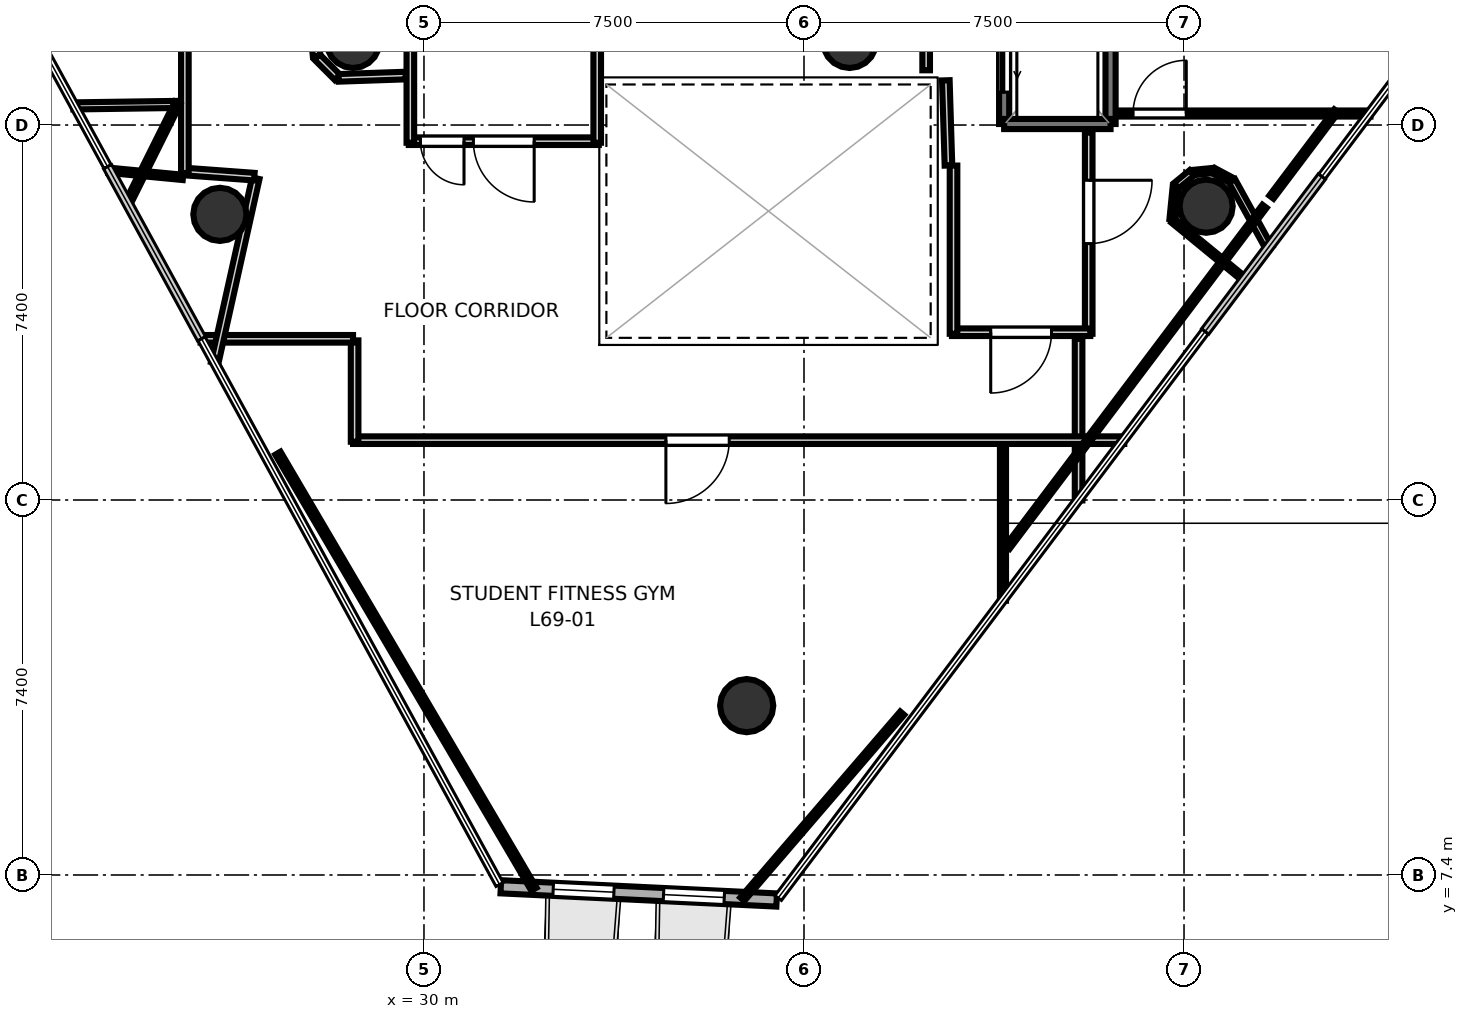
"""IFC4 building model, lengths in metres.
Left out: names, types, materials, properties, quantities, classifications, styles, units other than length and angle.
Written with IfcOpenShell. Run it as: python <this file> out.ifc"""

import sys

from ifc_helpers import new_model, si_unit, direction, frame, frame_2d, origin, origin_2d, place, context, subcontext, project, spatial, rectangle, hollow_circle, extrude, element, fill, save


model = new_model("IFC4")
c1 = context("Model", 3, precision=1e-05, world=origin(), true_north=direction((0.0, 1.0)))
c2 = subcontext(c1, "Body", "Model", "MODEL_VIEW")
j1 = project(units=[si_unit("LENGTHUNIT", "METRE"), si_unit("PLANEANGLEUNIT", "RADIAN")], contexts=[c1])
p1 = place(None, origin())
s1 = spatial("IfcSite", under=j1, at=p1, CompositionType="ELEMENT")
p2 = place(p1, origin())
s2 = spatial("IfcBuilding", under=s1, at=p2, CompositionType="ELEMENT")
p3 = place(p2, frame((0.0, 0.0, 268.6)))
s3 = spatial("IfcBuildingStorey", under=s2, at=p3, CompositionType="ELEMENT", Elevation=268.6)
for number, where, z_axis, x_axis in (
    (1, (28.6, 23.85, 0.0), (0.0, 0.0, 1.0), (1.0, 0.0, 0.0)),
    (2, (38.4, 23.85, 0.0), (0.0, 0.0, 1.0), (1.0, 0.0, 0.0)),
    (3, (25.972, 20.437, 0.0), (0.0, 0.0, 1.0), (1.0, 0.0, 0.0)),
    (4, (36.369, 10.742, 0.0), (0.0, 0.0, 1.0), (1.0, 0.0, 0.0)),
    (5, (45.436, 20.598, 0.0), (0.0, 0.0, 1.0), (1.0, 0.0, 0.0)),
):
    element("IfcColumn", number, at=place(p3, frame(where, z_axis=z_axis, x_axis=x_axis)), inside=s3, PredefinedType="COLUMN", context=c2, shape_type="SweptSolid", body=[
        extrude(hollow_circle(Radius=0.525, WallThickness=0.028, at=origin_2d()), origin(), (0.0, 0.0, 1.0), 3.7),
    ])
p4 = place(p3, frame((31.516, 7.167, 0.0), z_axis=(0.0, 0.0, 1.0), x_axis=(0.998850638903, -0.047931212827, 0.0)))
e6 = element("IfcWall", 6, at=p4, inside=s3, PredefinedType="SOLIDWALL", context=c2, shape_type="SweptSolid", body=[
    extrude(rectangle(XDim=5.45, YDim=0.26, at=frame_2d((2.725, 0.0))), origin(), (0.0, 0.0, 1.0), 3.52),
])
p5 = place(p4, frame((1.035, 0.0, 0.9)))
e7 = element("IfcOpeningElement", 7, at=p5, cuts=e6, PredefinedType="OPENING", context=c2, shape_type="SweptSolid", body=[
    extrude(rectangle(XDim=1.2, YDim=2.0, at=frame_2d((0.6, 1.0))), frame((0.0, 0.14, 0.0), z_axis=(0.0, -1.0, 0.0), x_axis=(1.0, 0.0, 0.0)), (0.0, 0.0, 1.0), 0.28),
])
p6 = place(p4, frame((3.215, 0.0, 0.9)))
e8 = element("IfcOpeningElement", 8, at=p6, cuts=e6, PredefinedType="OPENING", context=c2, shape_type="SweptSolid", body=[
    extrude(rectangle(XDim=1.2, YDim=2.0, at=frame_2d((0.6, 1.0))), frame((0.0, 0.14, 0.0), z_axis=(0.0, -1.0, 0.0), x_axis=(1.0, 0.0, 0.0)), (0.0, 0.0, 1.0), 0.28),
])
p7 = place(p3, frame((43.55, 22.22, 0.0), z_axis=(0.0, 0.0, 1.0), x_axis=(0.0, 1.0, 0.0)))
e9 = element("IfcWall", 9, at=p7, inside=s3, PredefinedType="SOLIDWALL", context=c2, shape_type="SweptSolid", body=[
    extrude(rectangle(XDim=2.36, YDim=0.2, at=frame_2d((1.18, 0.0))), origin(), (0.0, 0.0, 1.0), 3.52),
])
p8 = place(p3, frame((41.45, 22.22, 0.0), z_axis=(0.0, 0.0, 1.0), x_axis=(0.0, 1.0, 0.0)))
e10 = element("IfcWall", 10, at=p8, inside=s3, PredefinedType="SOLIDWALL", context=c2, shape_type="SweptSolid", body=[
    extrude(rectangle(XDim=2.36, YDim=0.2, at=frame_2d((1.18, 0.0))), origin(), (0.0, 0.0, 1.0), 3.52),
])
p9 = place(p8, frame((0.63, 0.0, 0.0)))
e11 = element("IfcOpeningElement", 11, at=p9, cuts=e10, PredefinedType="OPENING", context=c2, shape_type="SweptSolid", body=[
    extrude(rectangle(XDim=1.1, YDim=2.15, at=frame_2d((0.55, 1.075))), frame((0.0, 0.11, 0.0), z_axis=(0.0, -1.0, 0.0), x_axis=(1.0, 0.0, 0.0)), (0.0, 0.0, 1.0), 0.22),
])
p10 = place(p3, frame((41.45, 22.22, 0.0), z_axis=(0.0, 0.0, 1.0), x_axis=(1.0, 0.0, 0.0)))
e12 = element("IfcWall", 12, at=p10, inside=s3, PredefinedType="SOLIDWALL", context=c2, shape_type="SweptSolid", body=[
    extrude(rectangle(XDim=2.1, YDim=0.2, at=frame_2d((1.05, 0.0))), origin(), (0.0, 0.0, 1.0), 3.52),
])
p11 = place(p3, frame((33.45, 21.881, 0.0), z_axis=(0.0, 0.0, 1.0), x_axis=(-1.0, 0.0, 0.0)))
e13 = element("IfcWall", 13, at=p11, inside=s3, PredefinedType="PARTITIONING", context=c2, shape_type="SweptSolid", body=[
    extrude(rectangle(XDim=3.75, YDim=0.15, at=frame_2d((1.875, 0.0))), origin(), (0.0, 0.0, 1.0), 2.84),
])
p12 = place(p11, frame((1.275, 0.0, 0.0)))
e14 = element("IfcOpeningElement", 14, at=p12, cuts=e13, PredefinedType="OPENING", context=c2, shape_type="SweptSolid", body=[
    extrude(rectangle(XDim=1.2, YDim=2.15, at=frame_2d((0.6, 1.075))), frame((0.0, 0.085, 0.0), z_axis=(0.0, -1.0, 0.0), x_axis=(1.0, 0.0, 0.0)), (0.0, 0.0, 1.0), 0.17),
])
p13 = place(p11, frame((2.66, 0.0, 0.0)))
e15 = element("IfcOpeningElement", 15, at=p13, cuts=e13, PredefinedType="OPENING", context=c2, shape_type="SweptSolid", body=[
    extrude(rectangle(XDim=0.86, YDim=2.05, at=frame_2d((0.43, 1.025))), frame((0.0, 0.085, 0.0), z_axis=(0.0, -1.0, 0.0), x_axis=(1.0, 0.0, 0.0)), (0.0, 0.0, 1.0), 0.17),
])
for number, where, z_axis, x_axis in (
    (16, (29.731, 21.85, 0.0), (0.0, 0.0, 1.0), (0.0, 1.0, 0.0)),
    (17, (33.419, 24.542, 0.0), (0.0, 0.0, 1.0), (0.0, -1.0, 0.0)),
):
    element("IfcWall", number, at=place(p3, frame(where, z_axis=z_axis, x_axis=x_axis)), inside=s3, PredefinedType="PARTITIONING", context=c2, shape_type="SweptSolid", body=[
        extrude(rectangle(XDim=2.692, YDim=0.15, at=frame_2d((1.346, 0.0))), origin(), (0.0, 0.0, 1.0), 2.84),
    ])
p14 = place(p3, frame((40.351, 21.401, 0.0), z_axis=(0.0, 0.0, 1.0), x_axis=(-0.031058045979, 0.999517582527, 0.0)))
e18 = element("IfcWall", 18, at=p14, inside=s3, PredefinedType="PARTITIONING", context=c2, shape_type="SweptSolid", body=[
    extrude(rectangle(XDim=1.682, YDim=0.15, at=frame_2d((0.841, 0.0))), origin(), (0.0, 0.0, 1.0), 2.84),
])
p15 = place(p3, frame((39.911, 23.28, 0.0), z_axis=(0.0, 0.0, 1.0), x_axis=(0.0, 1.0, 0.0)))
e19 = element("IfcWall", 19, at=p15, inside=s3, PredefinedType="PARTITIONING", context=c2, shape_type="SweptSolid", body=[
    extrude(rectangle(XDim=1.48, YDim=0.15, at=frame_2d((0.74, 0.0))), origin(), (0.0, 0.0, 1.0), 2.84),
])
p16 = place(p3, frame((43.119, 22.05, 0.0), z_axis=(0.0, 0.0, 1.0), x_axis=(0.0, -1.0, 0.0)))
e20 = element("IfcWall", 20, at=p16, inside=s3, PredefinedType="PARTITIONING", context=c2, shape_type="SweptSolid", body=[
    extrude(rectangle(XDim=3.97, YDim=0.15, at=frame_2d((1.985, 0.0))), origin(), (0.0, 0.0, 1.0), 2.84),
])
p17 = place(p16, frame((0.94, 0.0, 0.0)))
e21 = element("IfcOpeningElement", 21, at=p17, cuts=e20, PredefinedType="OPENING", context=c2, shape_type="SweptSolid", body=[
    extrude(rectangle(XDim=1.25, YDim=2.2, at=frame_2d((0.625, 1.1))), frame((0.0, 0.085, 0.0), z_axis=(0.0, -1.0, 0.0), x_axis=(1.0, 0.0, 0.0)), (0.0, 0.0, 1.0), 0.17),
])
p18 = place(p3, frame((43.15, 18.111, 0.0), z_axis=(0.0, 0.0, 1.0), x_axis=(-1.0, 0.0, 0.0)))
e22 = element("IfcWall", 22, at=p18, inside=s3, PredefinedType="PARTITIONING", context=c2, shape_type="SweptSolid", body=[
    extrude(rectangle(XDim=2.73, YDim=0.15, at=frame_2d((1.365, 0.0))), origin(), (0.0, 0.0, 1.0), 2.84),
])
p19 = place(p18, frame((0.765, 0.0, 0.0)))
e23 = element("IfcOpeningElement", 23, at=p19, cuts=e22, PredefinedType="OPENING", context=c2, shape_type="SweptSolid", body=[
    extrude(rectangle(XDim=1.2, YDim=2.15, at=frame_2d((0.6, 1.075))), frame((0.0, 0.085, 0.0), z_axis=(0.0, -1.0, 0.0), x_axis=(1.0, 0.0, 0.0)), (0.0, 0.0, 1.0), 0.17),
])
p20 = place(p3, frame((40.451, 18.08, 0.0), z_axis=(0.0, 0.0, 1.0), x_axis=(0.0, 1.0, 0.0)))
e24 = element("IfcWall", 24, at=p20, inside=s3, PredefinedType="PARTITIONING", context=c2, shape_type="SweptSolid", body=[
    extrude(rectangle(XDim=3.32, YDim=0.15, at=frame_2d((1.66, 0.0))), origin(), (0.0, 0.0, 1.0), 2.84),
])
p21 = place(p3, frame((27.838, 23.992, 0.0), z_axis=(0.0, 0.0, 1.0), x_axis=(0.098273407977, -0.995159453196, 0.0)))
e25 = element("IfcWall", 25, at=p21, inside=s3, PredefinedType="PARTITIONING", context=c2, shape_type="SweptSolid", body=[
    extrude(rectangle(XDim=0.432, YDim=0.15, at=frame_2d((0.216, 0.0))), origin(), (0.0, 0.0, 1.0), 2.84),
])
p22 = place(p3, frame((27.89, 23.543, 0.0), z_axis=(0.0, 0.0, 1.0), x_axis=(0.707106781187, -0.707106781187, 0.0)))
e26 = element("IfcWall", 26, at=p22, inside=s3, PredefinedType="PARTITIONING", context=c2, shape_type="SweptSolid", body=[
    extrude(rectangle(XDim=0.57, YDim=0.15, at=frame_2d((0.285, 0.0))), origin(), (0.0, 0.0, 1.0), 2.84),
])
p23 = place(p3, frame((28.316, 23.131, 0.0), z_axis=(0.0, 0.0, 1.0), x_axis=(0.999405342193, 0.034481328227, 0.0)))
e27 = element("IfcWall", 27, at=p23, inside=s3, PredefinedType="PARTITIONING", context=c2, shape_type="SweptSolid", body=[
    extrude(rectangle(XDim=1.324, YDim=0.15, at=frame_2d((0.662, 0.0))), origin(), (0.0, 0.0, 1.0), 2.84),
])
p24 = place(p3, frame((42.919, 17.98, 0.0), z_axis=(0.0, 0.0, 1.0), x_axis=(0.0, -1.0, 0.0)))
e28 = element("IfcWall", 28, at=p24, inside=s3, PredefinedType="PARTITIONING", context=c2, shape_type="SweptSolid", body=[
    extrude(rectangle(XDim=3.188, YDim=0.15, at=frame_2d((1.594, 0.0))), origin(), (0.0, 0.0, 1.0), 2.84),
])
p25 = place(p3, frame((43.82, 15.981, 0.0), z_axis=(0.0, 0.0, 1.0), x_axis=(-1.0, 0.0, 0.0)))
e29 = element("IfcWall", 29, at=p25, inside=s3, PredefinedType="PARTITIONING", context=c2, shape_type="SweptSolid", body=[
    extrude(rectangle(XDim=15.22, YDim=0.15, at=frame_2d((7.61, 0.0))), origin(), (0.0, 0.0, 1.0), 2.84),
])
p26 = place(p25, frame((7.796, 0.0, 0.0)))
e30 = element("IfcOpeningElement", 30, at=p26, cuts=e29, PredefinedType="OPENING", context=c2, shape_type="SweptSolid", body=[
    extrude(rectangle(XDim=1.25, YDim=2.2, at=frame_2d((0.625, 1.1))), frame((0.0, 0.085, 0.0), z_axis=(0.0, -1.0, 0.0), x_axis=(1.0, 0.0, 0.0)), (0.0, 0.0, 1.0), 0.17),
])
p27 = place(p3, frame((28.631, 15.95, 0.0), z_axis=(0.0, 0.0, 1.0), x_axis=(0.0, 1.0, 0.0)))
e31 = element("IfcWall", 31, at=p27, inside=s3, PredefinedType="PARTITIONING", context=c2, shape_type="SweptSolid", body=[
    extrude(rectangle(XDim=2.0, YDim=0.15, at=frame_2d((1.0, 0.0))), origin(), (0.0, 0.0, 1.0), 2.84),
])
p28 = place(p3, frame((28.6, 17.981, 0.0), z_axis=(0.0, 0.0, 1.0), x_axis=(-1.0, 0.0, 0.0)))
e32 = element("IfcWall", 32, at=p28, inside=s3, PredefinedType="PARTITIONING", context=c2, shape_type="SweptSolid", body=[
    extrude(rectangle(XDim=3.009, YDim=0.15, at=frame_2d((1.505, 0.0))), origin(), (0.0, 0.0, 1.0), 2.84),
])
p29 = place(p3, frame((25.87, 17.507, 0.0), z_axis=(0.0, 0.0, 1.0), x_axis=(0.21736677809, 0.976089997789, 0.0)))
e33 = element("IfcWall", 33, at=p29, inside=s3, PredefinedType="PARTITIONING", context=c2, shape_type="SweptSolid", body=[
    extrude(rectangle(XDim=3.732, YDim=0.15, at=frame_2d((1.866, 0.0))), origin(), (0.0, 0.0, 1.0), 2.84),
])
p30 = place(p3, frame((26.652, 21.181, 0.0), z_axis=(0.0, 0.0, 1.0), x_axis=(-0.997303696291, 0.073384857861, 0.0)))
e34 = element("IfcWall", 34, at=p30, inside=s3, PredefinedType="PARTITIONING", context=c2, shape_type="SweptSolid", body=[
    extrude(rectangle(XDim=1.404, YDim=0.15, at=frame_2d((0.702, 0.0))), origin(), (0.0, 0.0, 1.0), 2.84),
])
p31 = place(p3, frame((25.281, 21.253, 0.0), z_axis=(0.0, 0.0, 1.0), x_axis=(0.0, 1.0, 0.0)))
e35 = element("IfcWall", 35, at=p31, inside=s3, PredefinedType="PARTITIONING", context=c2, shape_type="SweptSolid", body=[
    extrude(rectangle(XDim=11.297, YDim=0.15, at=frame_2d((5.648, 0.0))), origin(), (0.0, 0.0, 1.0), 2.84),
])
p32 = place(p31, frame((5.376, 0.0, 0.0)))
e36 = element("IfcOpeningElement", 36, at=p32, cuts=e35, PredefinedType="OPENING", context=c2, shape_type="SweptSolid", body=[
    extrude(rectangle(XDim=1.25, YDim=2.2, at=frame_2d((0.625, 1.1))), frame((0.0, 0.085, 0.0), z_axis=(0.0, -1.0, 0.0), x_axis=(1.0, 0.0, 0.0)), (0.0, 0.0, 1.0), 0.17),
])
p33 = place(p3, frame((23.081, 22.577, 0.0), z_axis=(0.0, 0.0, 1.0), x_axis=(0.999898450923, 0.014250889137, 0.0)))
e37 = element("IfcWall", 37, at=p33, inside=s3, PredefinedType="PARTITIONING", context=c2, shape_type="SweptSolid", body=[
    extrude(rectangle(XDim=2.09, YDim=0.14, at=frame_2d((1.045, 0.0))), origin(), (0.0, 0.0, 1.0), 2.84),
])
p34 = place(p3, frame((25.139, 22.638, 0.0), z_axis=(0.0, 0.0, 1.0), x_axis=(-0.445538600243, -0.895262729981, 0.0)))
e38 = element("IfcWall", 38, at=p34, inside=s3, PredefinedType="PARTITIONING", context=c2, shape_type="SweptSolid", body=[
    extrude(rectangle(XDim=2.217, YDim=0.12, at=frame_2d((1.108, 0.0))), origin(), (0.0, 0.0, 1.0), 2.84),
])
p35 = place(p3, frame((23.775, 21.307, 0.0), z_axis=(0.0, 0.0, 1.0), x_axis=(0.995414788173, -0.095652493361, 0.0)))
e39 = element("IfcWall", 39, at=p35, inside=s3, PredefinedType="PARTITIONING", context=c2, shape_type="SweptSolid", body=[
    extrude(rectangle(XDim=1.475, YDim=0.105, at=frame_2d((0.738, 0.0))), origin(), (0.0, 0.0, 1.0), 2.84),
])
p36 = place(p3, frame((41.427, 15.87, 0.0), z_axis=(0.0, 0.0, 1.0), x_axis=(0.0, -1.0, 0.0)))
e40 = element("IfcWall", 40, at=p36, inside=s3, PredefinedType="PARTITIONING", context=c2, shape_type="SweptSolid", body=[
    extrude(rectangle(XDim=3.058, YDim=0.12, at=frame_2d((1.529, 0.0))), origin(), (0.0, 0.0, 1.0), 2.84),
])
p37 = place(p3, frame((39.438, 10.593, 0.0), z_axis=(0.0, 0.0, 1.0), x_axis=(-0.652003318769, -0.75821611188, 0.0)))
e41 = element("IfcWall", 41, at=p37, inside=s3, PredefinedType="PARTITIONING", context=c2, shape_type="SweptSolid", body=[
    extrude(rectangle(XDim=4.841, YDim=0.105, at=frame_2d((2.42, 0.0))), origin(), (0.0, 0.0, 1.0), 2.84),
])
p38 = place(p3, frame((32.17, 7.119, 0.0), z_axis=(0.0, 0.0, 1.0), x_axis=(-0.506410593998, 0.862292473751, 0.0)))
e42 = element("IfcWall", 42, at=p38, inside=s3, PredefinedType="PARTITIONING", context=c2, shape_type="SweptSolid", body=[
    extrude(rectangle(XDim=9.979, YDim=0.12, at=frame_2d((4.99, 0.0))), origin(), (0.0, 0.0, 1.0), 2.84),
])
p39 = place(p3, frame((43.72, 22.427, 0.0), z_axis=(0.0, 0.0, 1.0), x_axis=(1.0, 0.0, 0.0)))
e43 = element("IfcWall", 43, at=p39, inside=s3, PredefinedType="PARTITIONING", context=c2, shape_type="SweptSolid", body=[
    extrude(rectangle(XDim=4.959, YDim=0.12, at=frame_2d((2.479, 0.0))), origin(), (0.0, 0.0, 1.0), 2.84),
])
p40 = place(p39, frame((0.274, 0.0, 0.0)))
e44 = element("IfcOpeningElement", 44, at=p40, cuts=e43, PredefinedType="OPENING", context=c2, shape_type="SweptSolid", body=[
    extrude(rectangle(XDim=1.05, YDim=2.15, at=frame_2d((0.525, 1.075))), frame((0.0, 0.07, 0.0), z_axis=(0.0, -1.0, 0.0), x_axis=(1.0, 0.0, 0.0)), (0.0, 0.0, 1.0), 0.14),
])
p41 = place(p3, frame((48.006, 22.477, 0.0), z_axis=(0.0, 0.0, 1.0), x_axis=(-0.601888401824, -0.798580209966, 0.0)))
e45 = element("IfcWall", 45, at=p41, inside=s3, PredefinedType="PARTITIONING", context=c2, shape_type="SweptSolid", body=[
    extrude(rectangle(XDim=2.129, YDim=0.105, at=frame_2d((1.064, 0.0))), origin(), (0.0, 0.0, 1.0), 2.84),
])
p42 = place(p3, frame((46.68, 19.771, 0.0), z_axis=(0.0, 0.0, 1.0), x_axis=(-0.483260506693, 0.875476603155, 0.0)))
e46 = element("IfcWall", 46, at=p42, inside=s3, PredefinedType="PARTITIONING", context=c2, shape_type="SweptSolid", body=[
    extrude(rectangle(XDim=1.515, YDim=0.14, at=frame_2d((0.758, 0.0))), origin(), (0.0, 0.0, 1.0), 2.84),
])
p43 = place(p3, frame((45.935, 21.11, 0.0), z_axis=(0.0, 0.0, 1.0), x_axis=(-0.881944865518, 0.471352579484, 0.0)))
e47 = element("IfcWall", 47, at=p43, inside=s3, PredefinedType="PARTITIONING", context=c2, shape_type="SweptSolid", body=[
    extrude(rectangle(XDim=0.398, YDim=0.12, at=frame_2d((0.199, 0.0))), origin(), (0.0, 0.0, 1.0), 2.84),
])
p44 = place(p3, frame((45.567, 21.301, 0.0), z_axis=(0.0, 0.0, 1.0), x_axis=(-0.995164018156, -0.098227170207, 0.0)))
e48 = element("IfcWall", 48, at=p44, inside=s3, PredefinedType="PARTITIONING", context=c2, shape_type="SweptSolid", body=[
    extrude(rectangle(XDim=0.398, YDim=0.105, at=frame_2d((0.199, 0.0))), origin(), (0.0, 0.0, 1.0), 2.84),
])
p45 = place(p3, frame((45.154, 21.255, 0.0), z_axis=(0.0, 0.0, 1.0), x_axis=(-0.773027083708, -0.634373019487, 0.0)))
e49 = element("IfcWall", 49, at=p45, inside=s3, PredefinedType="PARTITIONING", context=c2, shape_type="SweptSolid", body=[
    extrude(rectangle(XDim=0.398, YDim=0.14, at=frame_2d((0.199, 0.0))), origin(), (0.0, 0.0, 1.0), 2.84),
])
p46 = place(p3, frame((44.836, 20.982, 0.0), z_axis=(0.0, 0.0, 1.0), x_axis=(-0.098268734456, -0.995159914701, 0.0)))
e50 = element("IfcWall", 50, at=p46, inside=s3, PredefinedType="PARTITIONING", context=c2, shape_type="SweptSolid", body=[
    extrude(rectangle(XDim=0.646, YDim=0.12, at=frame_2d((0.323, 0.0))), origin(), (0.0, 0.0, 1.0), 2.84),
])
p47 = place(p3, frame((44.783, 20.312, 0.0), z_axis=(0.0, 0.0, 1.0), x_axis=(0.772976769478, -0.634434325874, 0.0)))
e51 = element("IfcWall", 51, at=p47, inside=s3, PredefinedType="PARTITIONING", context=c2, shape_type="SweptSolid", body=[
    extrude(rectangle(XDim=1.843, YDim=0.105, at=frame_2d((0.922, 0.0))), origin(), (0.0, 0.0, 1.0), 2.84),
])
p48 = place(p3, frame((46.589, 20.596, 0.0), z_axis=(0.0, 0.0, 1.0), x_axis=(-0.601917455768, -0.798558311234, 0.0)))
e52 = element("IfcWall", 52, at=p48, inside=s3, PredefinedType="PARTITIONING", context=c2, shape_type="SweptSolid", body=[
    extrude(rectangle(XDim=8.427, YDim=0.105, at=frame_2d((4.213, 0.0))), origin(), (0.0, 0.0, 1.0), 2.84),
])
p49 = place(p9, origin())
e53 = element("IfcDoor", 53, at=p49, inside=s3, OperationType="SLIDING_TO_LEFT", PredefinedType="DOOR", context=c2, shape_type="SweptSolid", body=[
    extrude(rectangle(XDim=1.1, YDim=2.15, at=frame_2d((0.55, 1.075))), frame((0.0, 0.025, 0.0), z_axis=(0.0, -1.0, 0.0), x_axis=(1.0, 0.0, 0.0)), (0.0, 0.0, 1.0), 0.05),
])
fill(e11, e53)
p50 = place(p12, origin())
e54 = element("IfcDoor", 54, at=p50, inside=s3, OperationType="SINGLE_SWING_LEFT", PredefinedType="DOOR", context=c2, shape_type="SweptSolid", body=[
    extrude(rectangle(XDim=1.2, YDim=2.15, at=frame_2d((0.6, 1.075))), frame((0.0, 0.025, 0.0), z_axis=(0.0, -1.0, 0.0), x_axis=(1.0, 0.0, 0.0)), (0.0, 0.0, 1.0), 0.05),
])
fill(e14, e54)
p51 = place(p19, origin())
e55 = element("IfcDoor", 55, at=p51, inside=s3, OperationType="SINGLE_SWING_RIGHT", PredefinedType="DOOR", context=c2, shape_type="SweptSolid", body=[
    extrude(rectangle(XDim=1.2, YDim=2.15, at=frame_2d((0.6, 1.075))), frame((0.0, 0.025, 0.0), z_axis=(0.0, -1.0, 0.0), x_axis=(1.0, 0.0, 0.0)), (0.0, 0.0, 1.0), 0.05),
])
fill(e23, e55)
p52 = place(p13, origin())
e56 = element("IfcDoor", 56, at=p52, inside=s3, OperationType="SINGLE_SWING_LEFT", PredefinedType="DOOR", context=c2, shape_type="SweptSolid", body=[
    extrude(rectangle(XDim=0.86, YDim=2.05, at=frame_2d((0.43, 1.025))), frame((0.0, 0.025, 0.0), z_axis=(0.0, -1.0, 0.0), x_axis=(1.0, 0.0, 0.0)), (0.0, 0.0, 1.0), 0.05),
])
fill(e15, e56)
p53 = place(p26, origin())
e57 = element("IfcDoor", 57, at=p53, inside=s3, OperationType="SINGLE_SWING_RIGHT", PredefinedType="DOOR", context=c2, shape_type="SweptSolid", body=[
    extrude(rectangle(XDim=1.25, YDim=2.2, at=frame_2d((0.625, 1.1))), frame((0.0, 0.025, 0.0), z_axis=(0.0, -1.0, 0.0), x_axis=(1.0, 0.0, 0.0)), (0.0, 0.0, 1.0), 0.05),
])
fill(e30, e57)
p54 = place(p17, origin())
e58 = element("IfcDoor", 58, at=p54, inside=s3, OperationType="SINGLE_SWING_LEFT", PredefinedType="DOOR", context=c2, shape_type="SweptSolid", body=[
    extrude(rectangle(XDim=1.25, YDim=2.2, at=frame_2d((0.625, 1.1))), frame((0.0, 0.025, 0.0), z_axis=(0.0, -1.0, 0.0), x_axis=(1.0, 0.0, 0.0)), (0.0, 0.0, 1.0), 0.05),
])
fill(e21, e58)
p55 = place(p40, origin())
e59 = element("IfcDoor", 59, at=p55, inside=s3, OperationType="SINGLE_SWING_RIGHT", PredefinedType="DOOR", context=c2, shape_type="SweptSolid", body=[
    extrude(rectangle(XDim=1.05, YDim=2.15, at=frame_2d((0.525, 1.075))), frame((0.0, 0.025, 0.0), z_axis=(0.0, -1.0, 0.0), x_axis=(1.0, 0.0, 0.0)), (0.0, 0.0, 1.0), 0.05),
])
fill(e44, e59)
p56 = place(p5, origin())
e60 = element("IfcWindow", 60, at=p56, inside=s3, PartitioningType="SINGLE_PANEL", PredefinedType="WINDOW", context=c2, shape_type="SweptSolid", body=[
    extrude(rectangle(XDim=1.2, YDim=2.0, at=frame_2d((0.6, 1.0))), frame((0.0, 0.03, 0.0), z_axis=(0.0, -1.0, 0.0), x_axis=(1.0, 0.0, 0.0)), (0.0, 0.0, 1.0), 0.06),
])
fill(e7, e60)
p57 = place(p6, origin())
e61 = element("IfcWindow", 61, at=p57, inside=s3, PartitioningType="SINGLE_PANEL", PredefinedType="WINDOW", context=c2, shape_type="SweptSolid", body=[
    extrude(rectangle(XDim=1.2, YDim=2.0, at=frame_2d((0.6, 1.0))), frame((0.0, 0.03, 0.0), z_axis=(0.0, -1.0, 0.0), x_axis=(1.0, 0.0, 0.0)), (0.0, 0.0, 1.0), 0.06),
])
fill(e8, e61)
save(model, sys.argv[1])
